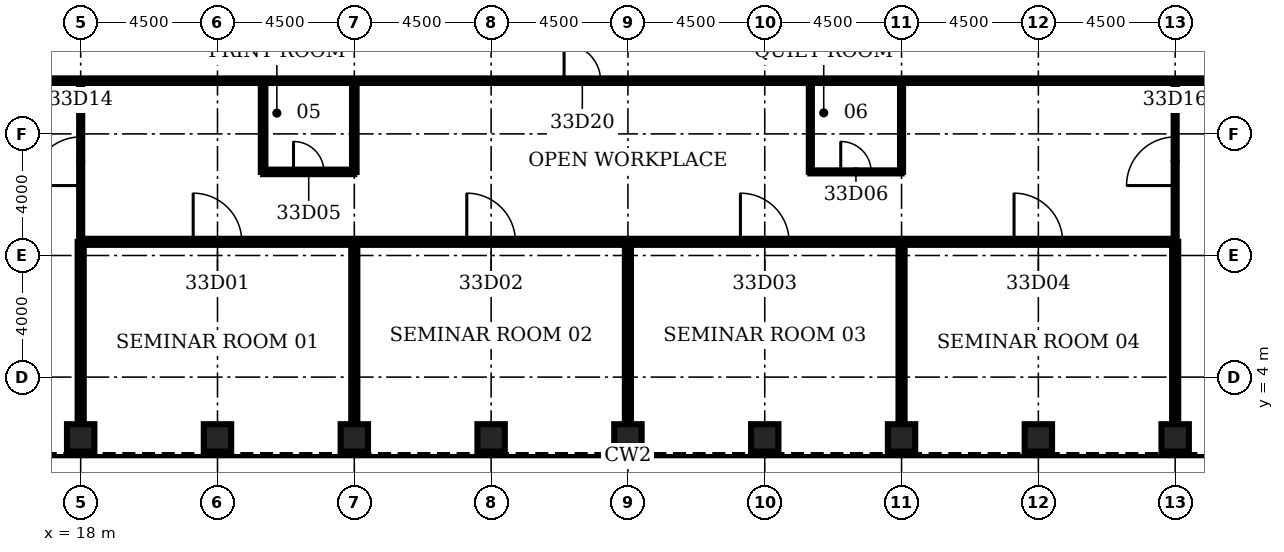
"""IFC4 building model, lengths in metres.
Left out: names, types, materials, properties, quantities, classifications, styles, units other than length and angle.
Written with IfcOpenShell. Run it as: python <this file> out.ifc"""

import sys

from ifc_helpers import new_model, si_unit, direction, frame, frame_2d, origin, origin_2d, place, context, subcontext, project, spatial, rectangle, hollow_rectangle, extrude, element, fill, save


model = new_model("IFC4")
c1 = context("Model", 3, precision=1e-05, world=origin(), true_north=direction((0.0, 1.0)))
c2 = subcontext(c1, "Body", "Model", "MODEL_VIEW")
j1 = project(units=[si_unit("LENGTHUNIT", "METRE"), si_unit("PLANEANGLEUNIT", "RADIAN")], contexts=[c1])
p1 = place(None, origin())
s1 = spatial("IfcSite", under=j1, at=p1, CompositionType="ELEMENT")
p2 = place(p1, origin())
s2 = spatial("IfcBuilding", under=s1, at=p2, CompositionType="ELEMENT")
p3 = place(p2, frame((0.0, 0.0, 150.9)))
s3 = spatial("IfcBuildingStorey", under=s2, at=p3, CompositionType="ELEMENT", Elevation=150.9)
for number, where, z_axis, x_axis in (
    (1, (18.0, 2.0, 0.0), (0.0, 0.0, 1.0), (0.0, 1.0, 0.0)),
    (2, (22.5, 2.0, 0.0), (0.0, 0.0, 1.0), (0.0, 1.0, 0.0)),
    (3, (27.0, 2.0, 0.0), (0.0, 0.0, 1.0), (0.0, 1.0, 0.0)),
    (4, (31.5, 2.0, 0.0), (0.0, 0.0, 1.0), (0.0, 1.0, 0.0)),
    (5, (36.0, 2.0, 0.0), (0.0, 0.0, 1.0), (0.0, 1.0, 0.0)),
    (6, (40.5, 2.0, 0.0), (0.0, 0.0, 1.0), (0.0, 1.0, 0.0)),
    (7, (45.0, 2.0, 0.0), (0.0, 0.0, 1.0), (0.0, 1.0, 0.0)),
    (8, (49.5, 2.0, 0.0), (0.0, 0.0, 1.0), (0.0, 1.0, 0.0)),
    (9, (54.0, 2.0, 0.0), (0.0, 0.0, 1.0), (0.0, 1.0, 0.0)),
):
    element("IfcColumn", number, at=place(p3, frame(where, z_axis=z_axis, x_axis=x_axis)), inside=s3, PredefinedType="COLUMN", context=c2, shape_type="SweptSolid", body=[
        extrude(hollow_rectangle(XDim=0.9, YDim=0.9, WallThickness=0.1, at=origin_2d()), origin(), (0.0, 0.0, 1.0), 4.2),
    ])
p4 = place(p3, frame((18.0, 8.45, 0.0), z_axis=(0.0, 0.0, 1.0), x_axis=(1.0, 0.0, 0.0)))
e10 = element("IfcWall", 10, at=p4, inside=s3, PredefinedType="PARTITIONING", context=c2, shape_type="SweptSolid", body=[
    extrude(rectangle(XDim=36.0, YDim=0.2, at=frame_2d((18.0, 0.0))), origin(), (0.0, 0.0, 1.0), 3.0),
])
p5 = place(p4, frame((3.7, 0.0, 0.0)))
e11 = element("IfcOpeningElement", 11, at=p5, cuts=e10, PredefinedType="OPENING", context=c2, shape_type="SweptSolid", body=[
    extrude(rectangle(XDim=1.6, YDim=2.1, at=frame_2d((0.8, 1.05))), frame((0.0, 0.11, 0.0), z_axis=(0.0, -1.0, 0.0), x_axis=(1.0, 0.0, 0.0)), (0.0, 0.0, 1.0), 0.22),
])
p6 = place(p4, frame((12.7, 0.0, 0.0)))
e12 = element("IfcOpeningElement", 12, at=p6, cuts=e10, PredefinedType="OPENING", context=c2, shape_type="SweptSolid", body=[
    extrude(rectangle(XDim=1.6, YDim=2.1, at=frame_2d((0.8, 1.05))), frame((0.0, 0.11, 0.0), z_axis=(0.0, -1.0, 0.0), x_axis=(1.0, 0.0, 0.0)), (0.0, 0.0, 1.0), 0.22),
])
p7 = place(p4, frame((21.7, 0.0, 0.0)))
e13 = element("IfcOpeningElement", 13, at=p7, cuts=e10, PredefinedType="OPENING", context=c2, shape_type="SweptSolid", body=[
    extrude(rectangle(XDim=1.6, YDim=2.1, at=frame_2d((0.8, 1.05))), frame((0.0, 0.11, 0.0), z_axis=(0.0, -1.0, 0.0), x_axis=(1.0, 0.0, 0.0)), (0.0, 0.0, 1.0), 0.22),
])
p8 = place(p4, frame((30.7, 0.0, 0.0)))
e14 = element("IfcOpeningElement", 14, at=p8, cuts=e10, PredefinedType="OPENING", context=c2, shape_type="SweptSolid", body=[
    extrude(rectangle(XDim=1.6, YDim=2.1, at=frame_2d((0.8, 1.05))), frame((0.0, 0.11, 0.0), z_axis=(0.0, -1.0, 0.0), x_axis=(1.0, 0.0, 0.0)), (0.0, 0.0, 1.0), 0.22),
])
p9 = place(p3, frame((24.0, 10.75, 0.0), z_axis=(0.0, 0.0, 1.0), x_axis=(1.0, 0.0, 0.0)))
e15 = element("IfcWall", 15, at=p9, inside=s3, PredefinedType="PARTITIONING", context=c2, shape_type="SweptSolid", body=[
    extrude(rectangle(XDim=3.0, YDim=0.15, at=frame_2d((1.5, 0.0))), origin(), (0.0, 0.0, 1.0), 3.0),
])
p10 = place(p9, frame((1.0, 0.0, 0.0)))
e16 = element("IfcOpeningElement", 16, at=p10, cuts=e15, PredefinedType="OPENING", context=c2, shape_type="SweptSolid", body=[
    extrude(rectangle(XDim=1.0, YDim=2.1, at=frame_2d((0.5, 1.05))), frame((0.0, 0.085, 0.0), z_axis=(0.0, -1.0, 0.0), x_axis=(1.0, 0.0, 0.0)), (0.0, 0.0, 1.0), 0.17),
])
p11 = place(p3, frame((42.0, 10.75, 0.0), z_axis=(0.0, 0.0, 1.0), x_axis=(1.0, 0.0, 0.0)))
e17 = element("IfcWall", 17, at=p11, inside=s3, PredefinedType="PARTITIONING", context=c2, shape_type="SweptSolid", body=[
    extrude(rectangle(XDim=3.0, YDim=0.1, at=frame_2d((1.5, 0.0))), origin(), (0.0, 0.0, 1.0), 3.0),
])
p12 = place(p11, frame((1.0, 0.0, 0.0)))
e18 = element("IfcOpeningElement", 18, at=p12, cuts=e17, PredefinedType="OPENING", context=c2, shape_type="SweptSolid", body=[
    extrude(rectangle(XDim=1.0, YDim=2.1, at=frame_2d((0.5, 1.05))), frame((0.0, 0.06, 0.0), z_axis=(0.0, -1.0, 0.0), x_axis=(1.0, 0.0, 0.0)), (0.0, 0.0, 1.0), 0.12),
])
p13 = place(p3, frame((15.15, 13.75, 0.0), z_axis=(0.0, 0.0, 1.0), x_axis=(1.0, 0.0, 0.0)))
e19 = element("IfcWall", 19, at=p13, inside=s3, PredefinedType="PARTITIONING", context=c2, shape_type="SweptSolid", body=[
    extrude(rectangle(XDim=41.7, YDim=0.15, at=frame_2d((20.85, 0.0))), origin(), (0.0, 0.0, 1.0), 3.0),
])
p14 = place(p13, frame((18.75, 0.0, 0.0)))
e20 = element("IfcOpeningElement", 20, at=p14, cuts=e19, PredefinedType="OPENING", context=c2, shape_type="SweptSolid", body=[
    extrude(rectangle(XDim=1.2, YDim=2.1, at=frame_2d((0.6, 1.05))), frame((0.0, 0.085, 0.0), z_axis=(0.0, -1.0, 0.0), x_axis=(1.0, 0.0, 0.0)), (0.0, 0.0, 1.0), 0.17),
])
p15 = place(p3, frame((18.0, 2.45, 0.0), z_axis=(0.0, 0.0, 1.0), x_axis=(0.0, 1.0, 0.0)))
e21 = element("IfcWall", 21, at=p15, inside=s3, PredefinedType="PARTITIONING", context=c2, shape_type="SweptSolid", body=[
    extrude(rectangle(XDim=6.0, YDim=0.2, at=frame_2d((3.0, 0.0))), origin(), (0.0, 0.0, 1.0), 3.0),
])
p16 = place(p3, frame((18.0, 8.45, 0.0), z_axis=(0.0, 0.0, 1.0), x_axis=(0.0, 1.0, 0.0)))
e22 = element("IfcWall", 22, at=p16, inside=s3, PredefinedType="PARTITIONING", context=c2, shape_type="SweptSolid", body=[
    extrude(rectangle(XDim=5.3, YDim=0.1, at=frame_2d((2.65, 0.0))), origin(), (0.0, 0.0, 1.0), 3.0),
])
p17 = place(p16, frame((1.85, 0.0, 0.0)))
e23 = element("IfcOpeningElement", 23, at=p17, cuts=e22, PredefinedType="OPENING", context=c2, shape_type="SweptSolid", body=[
    extrude(rectangle(XDim=1.6, YDim=2.1, at=frame_2d((0.8, 1.05))), frame((0.0, 0.06, 0.0), z_axis=(0.0, -1.0, 0.0), x_axis=(1.0, 0.0, 0.0)), (0.0, 0.0, 1.0), 0.12),
])
p18 = place(p3, frame((24.0, 10.75, 0.0), z_axis=(0.0, 0.0, 1.0), x_axis=(0.0, 1.0, 0.0)))
e24 = element("IfcWall", 24, at=p18, inside=s3, PredefinedType="PARTITIONING", context=c2, shape_type="SweptSolid", body=[
    extrude(rectangle(XDim=3.0, YDim=0.15, at=frame_2d((1.5, 0.0))), origin(), (0.0, 0.0, 1.0), 3.0),
])
p19 = place(p3, frame((27.0, 2.45, 0.0), z_axis=(0.0, 0.0, 1.0), x_axis=(0.0, 1.0, 0.0)))
e25 = element("IfcWall", 25, at=p19, inside=s3, PredefinedType="PARTITIONING", context=c2, shape_type="SweptSolid", body=[
    extrude(rectangle(XDim=6.0, YDim=0.2, at=frame_2d((3.0, 0.0))), origin(), (0.0, 0.0, 1.0), 3.0),
])
p20 = place(p3, frame((27.0, 10.75, 0.0), z_axis=(0.0, 0.0, 1.0), x_axis=(0.0, 1.0, 0.0)))
e26 = element("IfcWall", 26, at=p20, inside=s3, PredefinedType="PARTITIONING", context=c2, shape_type="SweptSolid", body=[
    extrude(rectangle(XDim=3.0, YDim=0.15, at=frame_2d((1.5, 0.0))), origin(), (0.0, 0.0, 1.0), 3.0),
])
p21 = place(p3, frame((36.0, 2.45, 0.0), z_axis=(0.0, 0.0, 1.0), x_axis=(0.0, 1.0, 0.0)))
e27 = element("IfcWall", 27, at=p21, inside=s3, PredefinedType="PARTITIONING", context=c2, shape_type="SweptSolid", body=[
    extrude(rectangle(XDim=6.0, YDim=0.2, at=frame_2d((3.0, 0.0))), origin(), (0.0, 0.0, 1.0), 3.0),
])
p22 = place(p3, frame((42.0, 10.75, 0.0), z_axis=(0.0, 0.0, 1.0), x_axis=(0.0, 1.0, 0.0)))
e28 = element("IfcWall", 28, at=p22, inside=s3, PredefinedType="PARTITIONING", context=c2, shape_type="SweptSolid", body=[
    extrude(rectangle(XDim=3.0, YDim=0.1, at=frame_2d((1.5, 0.0))), origin(), (0.0, 0.0, 1.0), 3.0),
])
p23 = place(p3, frame((45.0, 2.45, 0.0), z_axis=(0.0, 0.0, 1.0), x_axis=(0.0, 1.0, 0.0)))
e29 = element("IfcWall", 29, at=p23, inside=s3, PredefinedType="PARTITIONING", context=c2, shape_type="SweptSolid", body=[
    extrude(rectangle(XDim=6.0, YDim=0.2, at=frame_2d((3.0, 0.0))), origin(), (0.0, 0.0, 1.0), 3.0),
])
p24 = place(p3, frame((45.0, 10.75, 0.0), z_axis=(0.0, 0.0, 1.0), x_axis=(0.0, 1.0, 0.0)))
e30 = element("IfcWall", 30, at=p24, inside=s3, PredefinedType="PARTITIONING", context=c2, shape_type="SweptSolid", body=[
    extrude(rectangle(XDim=3.0, YDim=0.1, at=frame_2d((1.5, 0.0))), origin(), (0.0, 0.0, 1.0), 3.0),
])
p25 = place(p3, frame((54.0, 2.45, 0.0), z_axis=(0.0, 0.0, 1.0), x_axis=(0.0, 1.0, 0.0)))
e31 = element("IfcWall", 31, at=p25, inside=s3, PredefinedType="PARTITIONING", context=c2, shape_type="SweptSolid", body=[
    extrude(rectangle(XDim=6.0, YDim=0.2, at=frame_2d((3.0, 0.0))), origin(), (0.0, 0.0, 1.0), 3.0),
])
p26 = place(p3, frame((54.0, 8.45, 0.0), z_axis=(0.0, 0.0, 1.0), x_axis=(0.0, 1.0, 0.0)))
e32 = element("IfcWall", 32, at=p26, inside=s3, PredefinedType="PARTITIONING", context=c2, shape_type="SweptSolid", body=[
    extrude(rectangle(XDim=5.3, YDim=0.1, at=frame_2d((2.65, 0.0))), origin(), (0.0, 0.0, 1.0), 3.0),
])
p27 = place(p26, frame((1.85, 0.0, 0.0)))
e33 = element("IfcOpeningElement", 33, at=p27, cuts=e32, PredefinedType="OPENING", context=c2, shape_type="SweptSolid", body=[
    extrude(rectangle(XDim=1.6, YDim=2.1, at=frame_2d((0.8, 1.05))), frame((0.0, 0.06, 0.0), z_axis=(0.0, -1.0, 0.0), x_axis=(1.0, 0.0, 0.0)), (0.0, 0.0, 1.0), 0.12),
])
p28 = place(p5, origin())
e34 = element("IfcDoor", 34, at=p28, inside=s3, OperationType="SINGLE_SWING_LEFT", PredefinedType="DOOR", context=c2, shape_type="SweptSolid", body=[
    extrude(rectangle(XDim=1.6, YDim=2.1, at=frame_2d((0.8, 1.05))), frame((0.0, 0.025, 0.0), z_axis=(0.0, -1.0, 0.0), x_axis=(1.0, 0.0, 0.0)), (0.0, 0.0, 1.0), 0.05),
])
fill(e11, e34)
p29 = place(p6, origin())
e35 = element("IfcDoor", 35, at=p29, inside=s3, OperationType="SINGLE_SWING_LEFT", PredefinedType="DOOR", context=c2, shape_type="SweptSolid", body=[
    extrude(rectangle(XDim=1.6, YDim=2.1, at=frame_2d((0.8, 1.05))), frame((0.0, 0.025, 0.0), z_axis=(0.0, -1.0, 0.0), x_axis=(1.0, 0.0, 0.0)), (0.0, 0.0, 1.0), 0.05),
])
fill(e12, e35)
p30 = place(p7, origin())
e36 = element("IfcDoor", 36, at=p30, inside=s3, OperationType="SINGLE_SWING_LEFT", PredefinedType="DOOR", context=c2, shape_type="SweptSolid", body=[
    extrude(rectangle(XDim=1.6, YDim=2.1, at=frame_2d((0.8, 1.05))), frame((0.0, 0.025, 0.0), z_axis=(0.0, -1.0, 0.0), x_axis=(1.0, 0.0, 0.0)), (0.0, 0.0, 1.0), 0.05),
])
fill(e13, e36)
p31 = place(p8, origin())
e37 = element("IfcDoor", 37, at=p31, inside=s3, OperationType="SINGLE_SWING_LEFT", PredefinedType="DOOR", context=c2, shape_type="SweptSolid", body=[
    extrude(rectangle(XDim=1.6, YDim=2.1, at=frame_2d((0.8, 1.05))), frame((0.0, 0.025, 0.0), z_axis=(0.0, -1.0, 0.0), x_axis=(1.0, 0.0, 0.0)), (0.0, 0.0, 1.0), 0.05),
])
fill(e14, e37)
p32 = place(p10, origin())
e38 = element("IfcDoor", 38, at=p32, inside=s3, OperationType="SINGLE_SWING_LEFT", PredefinedType="DOOR", context=c2, shape_type="SweptSolid", body=[
    extrude(rectangle(XDim=1.0, YDim=2.1, at=frame_2d((0.5, 1.05))), frame((0.0, 0.025, 0.0), z_axis=(0.0, -1.0, 0.0), x_axis=(1.0, 0.0, 0.0)), (0.0, 0.0, 1.0), 0.05),
])
fill(e16, e38)
p33 = place(p12, origin())
e39 = element("IfcDoor", 39, at=p33, inside=s3, OperationType="SINGLE_SWING_LEFT", PredefinedType="DOOR", context=c2, shape_type="SweptSolid", body=[
    extrude(rectangle(XDim=1.0, YDim=2.1, at=frame_2d((0.5, 1.05))), frame((0.0, 0.025, 0.0), z_axis=(0.0, -1.0, 0.0), x_axis=(1.0, 0.0, 0.0)), (0.0, 0.0, 1.0), 0.05),
])
fill(e18, e39)
p34 = place(p17, origin())
e40 = element("IfcDoor", 40, at=p34, inside=s3, OperationType="SINGLE_SWING_LEFT", PredefinedType="DOOR", context=c2, shape_type="SweptSolid", body=[
    extrude(rectangle(XDim=1.6, YDim=2.1, at=frame_2d((0.8, 1.05))), frame((0.0, 0.025, 0.0), z_axis=(0.0, -1.0, 0.0), x_axis=(1.0, 0.0, 0.0)), (0.0, 0.0, 1.0), 0.05),
])
fill(e23, e40)
p35 = place(p27, origin())
e41 = element("IfcDoor", 41, at=p35, inside=s3, OperationType="SINGLE_SWING_LEFT", PredefinedType="DOOR", context=c2, shape_type="SweptSolid", body=[
    extrude(rectangle(XDim=1.6, YDim=2.1, at=frame_2d((0.8, 1.05))), frame((0.0, 0.025, 0.0), z_axis=(0.0, -1.0, 0.0), x_axis=(1.0, 0.0, 0.0)), (0.0, 0.0, 1.0), 0.05),
])
fill(e33, e41)
p36 = place(p14, origin())
e42 = element("IfcDoor", 42, at=p36, inside=s3, OperationType="SINGLE_SWING_LEFT", PredefinedType="DOOR", context=c2, shape_type="SweptSolid", body=[
    extrude(rectangle(XDim=1.2, YDim=2.1, at=frame_2d((0.6, 1.05))), frame((0.0, 0.025, 0.0), z_axis=(0.0, -1.0, 0.0), x_axis=(1.0, 0.0, 0.0)), (0.0, 0.0, 1.0), 0.05),
])
fill(e20, e42)
save(model, sys.argv[1])
